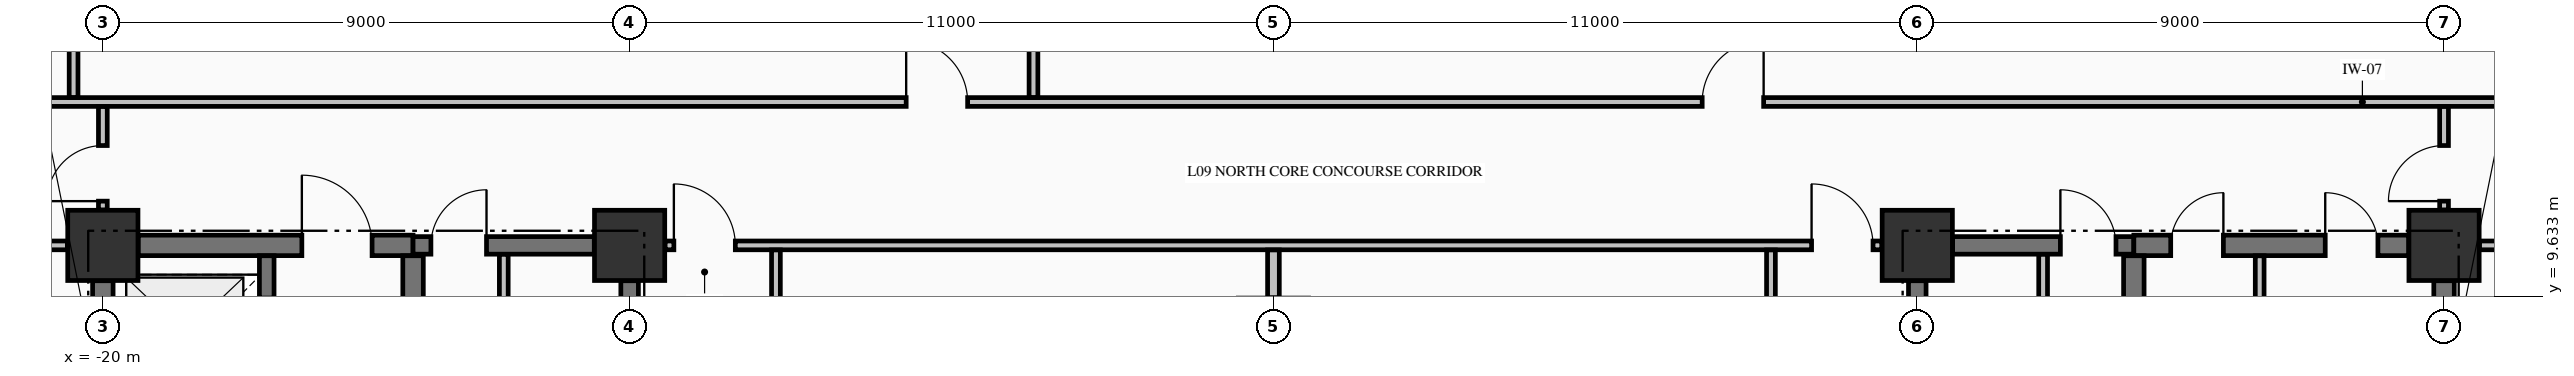
"""IFC4 building model, lengths in metres.
Left out: names, types, materials, properties, quantities, classifications, styles, units other than length and angle.
Written with IfcOpenShell. Run it as: python <this file> out.ifc"""

import sys

from ifc_helpers import new_model, si_unit, direction, frame, frame_2d, origin, origin_2d, place, context, subcontext, project, spatial, rectangle, extrude, element, fill, save


model = new_model("IFC4")
c1 = context("Model", 3, precision=1e-05, world=origin(), true_north=direction((0.0, 1.0)))
c2 = subcontext(c1, "Body", "Model", "MODEL_VIEW")
j1 = project(units=[si_unit("LENGTHUNIT", "METRE"), si_unit("PLANEANGLEUNIT", "RADIAN")], contexts=[c1])
p1 = place(None, origin())
s1 = spatial("IfcSite", under=j1, at=p1, CompositionType="ELEMENT")
p2 = place(p1, origin())
s2 = spatial("IfcBuilding", under=s1, at=p2, CompositionType="ELEMENT")
p3 = place(p2, frame((0.0, 0.0, 41.48)))
s3 = spatial("IfcBuildingStorey", under=s2, at=p3, CompositionType="ELEMENT", Elevation=41.48)
for number, where, z_axis, x_axis in (
    (1, (-20.0, 10.5, -0.25), (0.0, 0.0, 1.0), (1.0, 0.0, 0.0)),
    (2, (-11.0, 10.5, -0.25), (0.0, 0.0, 1.0), (1.0, 0.0, 0.0)),
    (3, (11.0, 10.5, -0.25), (0.0, 0.0, 1.0), (1.0, 0.0, 0.0)),
    (4, (20.0, 10.5, -0.25), (0.0, 0.0, 1.0), (1.0, 0.0, 0.0)),
):
    element("IfcColumn", number, at=place(p3, frame(where, z_axis=z_axis, x_axis=x_axis)), inside=s3, PredefinedType="COLUMN", context=c2, shape_type="SweptSolid", body=[
        extrude(rectangle(XDim=1.2, YDim=1.2, at=origin_2d()), origin(), (0.0, 0.0, 1.0), 3.57),
    ])
p4 = place(p3, frame((-19.396, 10.5, 0.0), z_axis=(0.0, 0.0, 1.0), x_axis=(1.0, 0.0, 0.0)))
e5 = element("IfcWall", 5, at=p4, inside=s3, PredefinedType="SHEAR", context=c2, shape_type="SweptSolid", body=[
    extrude(rectangle(XDim=4.696, YDim=0.35, at=frame_2d((2.348, 0.0))), origin(), (0.0, 0.0, 1.0), 3.32),
])
p5 = place(p4, frame((2.796, 0.0, 0.0)))
e6 = element("IfcOpeningElement", 6, at=p5, cuts=e5, PredefinedType="OPENING", context=c2, shape_type="SweptSolid", body=[
    extrude(rectangle(XDim=1.2, YDim=2.15, at=frame_2d((0.6, 1.075))), frame((0.0, 0.185, 0.0), z_axis=(0.0, -1.0, 0.0), x_axis=(1.0, 0.0, 0.0)), (0.0, 0.0, 1.0), 0.37),
])
p6 = place(p3, frame((-14.7, 10.5, 0.0), z_axis=(0.0, 0.0, 1.0), x_axis=(1.0, 0.0, 0.0)))
e7 = element("IfcWall", 7, at=p6, inside=s3, PredefinedType="SHEAR", context=c2, shape_type="SweptSolid", body=[
    extrude(rectangle(XDim=3.096, YDim=0.3, at=frame_2d((1.548, 0.0))), origin(), (0.0, 0.0, 1.0), 3.32),
])
p7 = place(p6, frame((0.305, 0.0, 0.0)))
e8 = element("IfcOpeningElement", 8, at=p7, cuts=e7, PredefinedType="OPENING", context=c2, shape_type="SweptSolid", body=[
    extrude(rectangle(XDim=0.95, YDim=2.15, at=frame_2d((0.475, 1.075))), frame((0.0, 0.16, 0.0), z_axis=(0.0, -1.0, 0.0), x_axis=(1.0, 0.0, 0.0)), (0.0, 0.0, 1.0), 0.32),
])
p8 = place(p3, frame((11.604, 10.5, 0.0), z_axis=(0.0, 0.0, 1.0), x_axis=(1.0, 0.0, 0.0)))
e9 = element("IfcWall", 9, at=p8, inside=s3, PredefinedType="SHEAR", context=c2, shape_type="SweptSolid", body=[
    extrude(rectangle(XDim=3.096, YDim=0.3, at=frame_2d((1.548, 0.0))), origin(), (0.0, 0.0, 1.0), 3.32),
])
p9 = place(p8, frame((1.841, 0.0, 0.0)))
e10 = element("IfcOpeningElement", 10, at=p9, cuts=e9, PredefinedType="OPENING", context=c2, shape_type="SweptSolid", body=[
    extrude(rectangle(XDim=0.95, YDim=2.15, at=frame_2d((0.475, 1.075))), frame((0.0, 0.16, 0.0), z_axis=(0.0, -1.0, 0.0), x_axis=(1.0, 0.0, 0.0)), (0.0, 0.0, 1.0), 0.32),
])
p10 = place(p3, frame((14.7, 10.5, 0.0), z_axis=(0.0, 0.0, 1.0), x_axis=(1.0, 0.0, 0.0)))
e11 = element("IfcWall", 11, at=p10, inside=s3, PredefinedType="SHEAR", context=c2, shape_type="SweptSolid", body=[
    extrude(rectangle(XDim=4.696, YDim=0.35, at=frame_2d((2.348, 0.0))), origin(), (0.0, 0.0, 1.0), 3.32),
])
p11 = place(p10, frame((0.63, 0.0, 0.0)))
e12 = element("IfcOpeningElement", 12, at=p11, cuts=e11, PredefinedType="OPENING", context=c2, shape_type="SweptSolid", body=[
    extrude(rectangle(XDim=0.9, YDim=2.15, at=frame_2d((0.45, 1.075))), frame((0.0, 0.185, 0.0), z_axis=(0.0, -1.0, 0.0), x_axis=(1.0, 0.0, 0.0)), (0.0, 0.0, 1.0), 0.37),
])
p12 = place(p10, frame((3.27, 0.0, 0.0)))
e13 = element("IfcOpeningElement", 13, at=p12, cuts=e11, PredefinedType="OPENING", context=c2, shape_type="SweptSolid", body=[
    extrude(rectangle(XDim=0.9, YDim=2.15, at=frame_2d((0.45, 1.075))), frame((0.0, 0.185, 0.0), z_axis=(0.0, -1.0, 0.0), x_axis=(1.0, 0.0, 0.0)), (0.0, 0.0, 1.0), 0.37),
])
p13 = place(p3, frame((-23.835, 10.5, 0.0), z_axis=(0.0, 0.0, 1.0), x_axis=(1.0, 0.0, 0.0)))
e14 = element("IfcWall", 14, at=p13, inside=s3, PredefinedType="PARTITIONING", context=c2, shape_type="SweptSolid", body=[
    extrude(rectangle(XDim=3.229, YDim=0.15, at=frame_2d((1.615, 0.0))), origin(), (0.0, 0.0, 1.0), 3.32),
])
p14 = place(p13, frame((1.36, 0.0, 0.0)))
e15 = element("IfcOpeningElement", 15, at=p14, cuts=e14, PredefinedType="OPENING", context=c2, shape_type="SweptSolid", body=[
    extrude(rectangle(XDim=0.95, YDim=2.15, at=frame_2d((0.475, 1.075))), frame((0.0, 0.085, 0.0), z_axis=(0.0, -1.0, 0.0), x_axis=(1.0, 0.0, 0.0)), (0.0, 0.0, 1.0), 0.17),
])
p15 = place(p3, frame((-10.394, 10.5, 0.0), z_axis=(0.0, 0.0, 1.0), x_axis=(1.0, 0.0, 0.0)))
e16 = element("IfcWall", 16, at=p15, inside=s3, PredefinedType="PARTITIONING", context=c2, shape_type="SweptSolid", body=[
    extrude(rectangle(XDim=20.788, YDim=0.15, at=frame_2d((10.394, 0.0))), origin(), (0.0, 0.0, 1.0), 3.32),
])
p16 = place(p15, frame((0.15, 0.0, 0.0)))
e17 = element("IfcOpeningElement", 17, at=p16, cuts=e16, PredefinedType="OPENING", context=c2, shape_type="SweptSolid", body=[
    extrude(rectangle(XDim=1.05, YDim=2.15, at=frame_2d((0.525, 1.075))), frame((0.0, 0.085, 0.0), z_axis=(0.0, -1.0, 0.0), x_axis=(1.0, 0.0, 0.0)), (0.0, 0.0, 1.0), 0.17),
])
p17 = place(p15, frame((19.588, 0.0, 0.0)))
e18 = element("IfcOpeningElement", 18, at=p17, cuts=e16, PredefinedType="OPENING", context=c2, shape_type="SweptSolid", body=[
    extrude(rectangle(XDim=1.05, YDim=2.15, at=frame_2d((0.525, 1.075))), frame((0.0, 0.085, 0.0), z_axis=(0.0, -1.0, 0.0), x_axis=(1.0, 0.0, 0.0)), (0.0, 0.0, 1.0), 0.17),
])
p18 = place(p3, frame((20.606, 10.5, 0.0), z_axis=(0.0, 0.0, 1.0), x_axis=(1.0, 0.0, 0.0)))
e19 = element("IfcWall", 19, at=p18, inside=s3, PredefinedType="PARTITIONING", context=c2, shape_type="SweptSolid", body=[
    extrude(rectangle(XDim=8.229, YDim=0.15, at=frame_2d((4.115, 0.0))), origin(), (0.0, 0.0, 1.0), 3.32),
])
p19 = place(p18, frame((3.394, 0.0, 0.0)))
e20 = element("IfcOpeningElement", 20, at=p19, cuts=e19, PredefinedType="OPENING", context=c2, shape_type="SweptSolid", body=[
    extrude(rectangle(XDim=1.0, YDim=2.15, at=frame_2d((0.5, 1.075))), frame((0.0, 0.085, 0.0), z_axis=(0.0, -1.0, 0.0), x_axis=(1.0, 0.0, 0.0)), (0.0, 0.0, 1.0), 0.17),
])
p20 = place(p3, frame((-23.835, 12.95, 0.0), z_axis=(0.0, 0.0, 1.0), x_axis=(1.0, 0.0, 0.0)))
e21 = element("IfcWall", 21, at=p20, inside=s3, PredefinedType="PARTITIONING", context=c2, shape_type="SweptSolid", body=[
    extrude(rectangle(XDim=52.67, YDim=0.15, at=frame_2d((26.335, 0.0))), origin(), (0.0, 0.0, 1.0), 3.32),
])
p21 = place(p20, frame((17.56, 0.0, 0.0)))
e22 = element("IfcOpeningElement", 22, at=p21, cuts=e21, PredefinedType="OPENING", context=c2, shape_type="SweptSolid", body=[
    extrude(rectangle(XDim=1.05, YDim=2.15, at=frame_2d((0.525, 1.075))), frame((0.0, 0.085, 0.0), z_axis=(0.0, -1.0, 0.0), x_axis=(1.0, 0.0, 0.0)), (0.0, 0.0, 1.0), 0.17),
])
p22 = place(p20, frame((31.16, 0.0, 0.0)))
e23 = element("IfcOpeningElement", 23, at=p22, cuts=e21, PredefinedType="OPENING", context=c2, shape_type="SweptSolid", body=[
    extrude(rectangle(XDim=1.05, YDim=2.15, at=frame_2d((0.525, 1.075))), frame((0.0, 0.085, 0.0), z_axis=(0.0, -1.0, 0.0), x_axis=(1.0, 0.0, 0.0)), (0.0, 0.0, 1.0), 0.17),
])
p23 = place(p3, frame((-20.0, 7.727, 0.0), z_axis=(0.0, 0.0, 1.0), x_axis=(0.0, 1.0, 0.0)))
e24 = element("IfcWall", 24, at=p23, inside=s3, PredefinedType="SHEAR", context=c2, shape_type="SweptSolid", body=[
    extrude(rectangle(XDim=2.169, YDim=0.35, at=frame_2d((1.084, 0.0))), origin(), (0.0, 0.0, 1.0), 3.32),
])
p24 = place(p3, frame((-17.2, 7.727, 0.0), z_axis=(0.0, 0.0, 1.0), x_axis=(0.0, 1.0, 0.0)))
e25 = element("IfcWall", 25, at=p24, inside=s3, PredefinedType="SOLIDWALL", context=c2, shape_type="SweptSolid", body=[
    extrude(rectangle(XDim=2.596, YDim=0.25, at=frame_2d((1.298, 0.0))), origin(), (0.0, 0.0, 1.0), 3.32),
])
p25 = place(p24, frame((0.773, 0.0, 0.0)))
e26 = element("IfcOpeningElement", 26, at=p25, cuts=e25, PredefinedType="OPENING", context=c2, shape_type="SweptSolid", body=[
    extrude(rectangle(XDim=1.1, YDim=2.2, at=frame_2d((0.55, 1.1))), frame((0.0, 0.135, 0.0), z_axis=(0.0, -1.0, 0.0), x_axis=(1.0, 0.0, 0.0)), (0.0, 0.0, 1.0), 0.27),
])
p26 = place(p3, frame((-14.7, 5.852, 0.0), z_axis=(0.0, 0.0, 1.0), x_axis=(0.0, 1.0, 0.0)))
e27 = element("IfcWall", 27, at=p26, inside=s3, PredefinedType="SHEAR", context=c2, shape_type="SweptSolid", body=[
    extrude(rectangle(XDim=4.471, YDim=0.35, at=frame_2d((2.235, 0.0))), origin(), (0.0, 0.0, 1.0), 3.32),
])
for number, where, z_axis, x_axis in (
    (28, (-11.0, 5.852, 0.0), (0.0, 0.0, 1.0), (0.0, 1.0, 0.0)),
    (29, (11.0, 5.852, 0.0), (0.0, 0.0, 1.0), (0.0, 1.0, 0.0)),
):
    element("IfcWall", number, at=place(p3, frame(where, z_axis=z_axis, x_axis=x_axis)), inside=s3, PredefinedType="SHEAR", context=c2, shape_type="SweptSolid", body=[
        extrude(rectangle(XDim=4.044, YDim=0.3, at=frame_2d((2.022, 0.0))), origin(), (0.0, 0.0, 1.0), 3.32),
    ])
p27 = place(p3, frame((14.7, 5.852, 0.0), z_axis=(0.0, 0.0, 1.0), x_axis=(0.0, 1.0, 0.0)))
e30 = element("IfcWall", 30, at=p27, inside=s3, PredefinedType="SHEAR", context=c2, shape_type="SweptSolid", body=[
    extrude(rectangle(XDim=4.471, YDim=0.35, at=frame_2d((2.235, 0.0))), origin(), (0.0, 0.0, 1.0), 3.32),
])
p28 = place(p3, frame((20.0, 0.604, 0.0), z_axis=(0.0, 0.0, 1.0), x_axis=(0.0, 1.0, 0.0)))
e31 = element("IfcWall", 31, at=p28, inside=s3, PredefinedType="SHEAR", context=c2, shape_type="SweptSolid", body=[
    extrude(rectangle(XDim=9.292, YDim=0.35, at=frame_2d((4.646, 0.0))), origin(), (0.0, 0.0, 1.0), 3.32),
])
p29 = place(p3, frame((-20.5, 13.028, 0.0), z_axis=(0.0, 0.0, 1.0), x_axis=(0.0, 1.0, 0.0)))
e32 = element("IfcWall", 32, at=p29, inside=s3, PredefinedType="PARTITIONING", context=c2, shape_type="SweptSolid", body=[
    extrude(rectangle(XDim=9.266, YDim=0.15, at=frame_2d((4.633, 0.0))), origin(), (0.0, 0.0, 1.0), 3.32),
])
p30 = place(p3, frame((-20.0, 11.106, 0.0), z_axis=(0.0, 0.0, 1.0), x_axis=(0.0, 1.0, 0.0)))
e33 = element("IfcWall", 33, at=p30, inside=s3, PredefinedType="PARTITIONING", context=c2, shape_type="SweptSolid", body=[
    extrude(rectangle(XDim=1.766, YDim=0.15, at=frame_2d((0.883, 0.0))), origin(), (0.0, 0.0, 1.0), 3.32),
])
p31 = place(p30, frame((0.15, 0.0, 0.0)))
e34 = element("IfcOpeningElement", 34, at=p31, cuts=e33, PredefinedType="OPENING", context=c2, shape_type="SweptSolid", body=[
    extrude(rectangle(XDim=0.95, YDim=2.15, at=frame_2d((0.475, 1.075))), frame((0.0, 0.085, 0.0), z_axis=(0.0, -1.0, 0.0), x_axis=(1.0, 0.0, 0.0)), (0.0, 0.0, 1.0), 0.17),
])
p32 = place(p3, frame((-13.15, 7.228, 0.0), z_axis=(0.0, 0.0, 1.0), x_axis=(0.0, 1.0, 0.0)))
e35 = element("IfcWall", 35, at=p32, inside=s3, PredefinedType="PARTITIONING", context=c2, shape_type="SweptSolid", body=[
    extrude(rectangle(XDim=3.119, YDim=0.15, at=frame_2d((1.56, 0.0))), origin(), (0.0, 0.0, 1.0), 3.32),
])
p33 = place(p32, frame((1.097, 0.0, 0.0)))
e36 = element("IfcOpeningElement", 36, at=p33, cuts=e35, PredefinedType="OPENING", context=c2, shape_type="SweptSolid", body=[
    extrude(rectangle(XDim=0.95, YDim=2.15, at=frame_2d((0.475, 1.075))), frame((0.0, 0.085, 0.0), z_axis=(0.0, -1.0, 0.0), x_axis=(1.0, 0.0, 0.0)), (0.0, 0.0, 1.0), 0.17),
])
p34 = place(p3, frame((-8.5, 3.703, 0.0), z_axis=(0.0, 0.0, 1.0), x_axis=(0.0, 1.0, 0.0)))
e37 = element("IfcWall", 37, at=p34, inside=s3, PredefinedType="PARTITIONING", context=c2, shape_type="SweptSolid", body=[
    extrude(rectangle(XDim=6.719, YDim=0.15, at=frame_2d((3.36, 0.0))), origin(), (0.0, 0.0, 1.0), 3.32),
])
p35 = place(p34, frame((2.822, 0.0, 0.0)))
e38 = element("IfcOpeningElement", 38, at=p35, cuts=e37, PredefinedType="OPENING", context=c2, shape_type="SweptSolid", body=[
    extrude(rectangle(XDim=1.05, YDim=2.15, at=frame_2d((0.525, 1.075))), frame((0.0, 0.085, 0.0), z_axis=(0.0, -1.0, 0.0), x_axis=(1.0, 0.0, 0.0)), (0.0, 0.0, 1.0), 0.17),
])
p36 = place(p3, frame((-4.1, 13.028, 0.0), z_axis=(0.0, 0.0, 1.0), x_axis=(0.0, 1.0, 0.0)))
e39 = element("IfcWall", 39, at=p36, inside=s3, PredefinedType="PARTITIONING", context=c2, shape_type="SweptSolid", body=[
    extrude(rectangle(XDim=13.307, YDim=0.15, at=frame_2d((6.653, 0.0))), origin(), (0.0, 0.0, 1.0), 3.32),
])
p37 = place(p3, frame((0.0, 9.606, 0.0), z_axis=(0.0, 0.0, 1.0), x_axis=(0.0, 1.0, 0.0)))
e40 = element("IfcWall", 40, at=p37, inside=s3, PredefinedType="PARTITIONING", context=c2, shape_type="SweptSolid", body=[
    extrude(rectangle(XDim=0.816, YDim=0.2, at=frame_2d((0.408, 0.0))), origin(), (0.0, 0.0, 1.0), 2.66),
])
p38 = place(p3, frame((8.5, -1.097, 0.0), z_axis=(0.0, 0.0, 1.0), x_axis=(0.0, 1.0, 0.0)))
e41 = element("IfcWall", 41, at=p38, inside=s3, PredefinedType="PARTITIONING", context=c2, shape_type="SweptSolid", body=[
    extrude(rectangle(XDim=11.519, YDim=0.15, at=frame_2d((5.76, 0.0))), origin(), (0.0, 0.0, 1.0), 3.32),
])
p39 = place(p38, frame((5.197, 0.0, 0.0)))
e42 = element("IfcOpeningElement", 42, at=p39, cuts=e41, PredefinedType="OPENING", context=c2, shape_type="SweptSolid", body=[
    extrude(rectangle(XDim=1.1, YDim=2.15, at=frame_2d((0.55, 1.075))), frame((0.0, 0.085, 0.0), z_axis=(0.0, -1.0, 0.0), x_axis=(1.0, 0.0, 0.0)), (0.0, 0.0, 1.0), 0.17),
])
p40 = place(p3, frame((13.15, 7.228, 0.0), z_axis=(0.0, 0.0, 1.0), x_axis=(0.0, 1.0, 0.0)))
e43 = element("IfcWall", 43, at=p40, inside=s3, PredefinedType="PARTITIONING", context=c2, shape_type="SweptSolid", body=[
    extrude(rectangle(XDim=3.119, YDim=0.15, at=frame_2d((1.56, 0.0))), origin(), (0.0, 0.0, 1.0), 3.32),
])
p41 = place(p40, frame((1.097, 0.0, 0.0)))
e44 = element("IfcOpeningElement", 44, at=p41, cuts=e43, PredefinedType="OPENING", context=c2, shape_type="SweptSolid", body=[
    extrude(rectangle(XDim=0.95, YDim=2.15, at=frame_2d((0.475, 1.075))), frame((0.0, 0.085, 0.0), z_axis=(0.0, -1.0, 0.0), x_axis=(1.0, 0.0, 0.0)), (0.0, 0.0, 1.0), 0.17),
])
p42 = place(p3, frame((16.85, 3.078, 0.0), z_axis=(0.0, 0.0, 1.0), x_axis=(0.0, 1.0, 0.0)))
e45 = element("IfcWall", 45, at=p42, inside=s3, PredefinedType="PARTITIONING", context=c2, shape_type="SweptSolid", body=[
    extrude(rectangle(XDim=7.244, YDim=0.15, at=frame_2d((3.622, 0.0))), origin(), (0.0, 0.0, 1.0), 3.32),
])
p43 = place(p3, frame((20.0, 11.106, 0.0), z_axis=(0.0, 0.0, 1.0), x_axis=(0.0, 1.0, 0.0)))
e46 = element("IfcWall", 46, at=p43, inside=s3, PredefinedType="PARTITIONING", context=c2, shape_type="SweptSolid", body=[
    extrude(rectangle(XDim=1.766, YDim=0.15, at=frame_2d((0.883, 0.0))), origin(), (0.0, 0.0, 1.0), 2.66),
])
p44 = place(p43, frame((0.15, 0.0, 0.0)))
e47 = element("IfcOpeningElement", 47, at=p44, cuts=e46, PredefinedType="OPENING", context=c2, shape_type="SweptSolid", body=[
    extrude(rectangle(XDim=0.95, YDim=2.15, at=frame_2d((0.475, 1.075))), frame((0.0, 0.085, 0.0), z_axis=(0.0, -1.0, 0.0), x_axis=(1.0, 0.0, 0.0)), (0.0, 0.0, 1.0), 0.17),
])
p45 = place(p7, origin())
e48 = element("IfcDoor", 48, at=p45, inside=s3, OperationType="SINGLE_SWING_RIGHT", PredefinedType="DOOR", context=c2, shape_type="SweptSolid", body=[
    extrude(rectangle(XDim=0.95, YDim=2.15, at=frame_2d((0.475, 1.075))), frame((0.0, 0.025, 0.0), z_axis=(0.0, -1.0, 0.0), x_axis=(1.0, 0.0, 0.0)), (0.0, 0.0, 1.0), 0.05),
])
fill(e8, e48)
p46 = place(p9, origin())
e49 = element("IfcDoor", 49, at=p46, inside=s3, OperationType="SINGLE_SWING_LEFT", PredefinedType="DOOR", context=c2, shape_type="SweptSolid", body=[
    extrude(rectangle(XDim=0.95, YDim=2.15, at=frame_2d((0.475, 1.075))), frame((0.0, 0.025, 0.0), z_axis=(0.0, -1.0, 0.0), x_axis=(1.0, 0.0, 0.0)), (0.0, 0.0, 1.0), 0.05),
])
fill(e10, e49)
p47 = place(p5, origin())
e50 = element("IfcDoor", 50, at=p47, inside=s3, OperationType="SINGLE_SWING_LEFT", PredefinedType="DOOR", context=c2, shape_type="SweptSolid", body=[
    extrude(rectangle(XDim=1.2, YDim=2.15, at=frame_2d((0.6, 1.075))), frame((0.0, 0.025, 0.0), z_axis=(0.0, -1.0, 0.0), x_axis=(1.0, 0.0, 0.0)), (0.0, 0.0, 1.0), 0.05),
])
fill(e6, e50)
p48 = place(p11, origin())
e51 = element("IfcDoor", 51, at=p48, inside=s3, OperationType="SINGLE_SWING_RIGHT", PredefinedType="DOOR", context=c2, shape_type="SweptSolid", body=[
    extrude(rectangle(XDim=0.9, YDim=2.15, at=frame_2d((0.45, 1.075))), frame((0.0, 0.025, 0.0), z_axis=(0.0, -1.0, 0.0), x_axis=(1.0, 0.0, 0.0)), (0.0, 0.0, 1.0), 0.05),
])
fill(e12, e51)
p49 = place(p12, origin())
e52 = element("IfcDoor", 52, at=p49, inside=s3, OperationType="SINGLE_SWING_LEFT", PredefinedType="DOOR", context=c2, shape_type="SweptSolid", body=[
    extrude(rectangle(XDim=0.9, YDim=2.15, at=frame_2d((0.45, 1.075))), frame((0.0, 0.025, 0.0), z_axis=(0.0, -1.0, 0.0), x_axis=(1.0, 0.0, 0.0)), (0.0, 0.0, 1.0), 0.05),
])
fill(e13, e52)
p50 = place(p16, origin())
e53 = element("IfcDoor", 53, at=p50, inside=s3, OperationType="SINGLE_SWING_LEFT", PredefinedType="DOOR", context=c2, shape_type="SweptSolid", body=[
    extrude(rectangle(XDim=1.05, YDim=2.15, at=frame_2d((0.525, 1.075))), frame((0.0, 0.025, 0.0), z_axis=(0.0, -1.0, 0.0), x_axis=(1.0, 0.0, 0.0)), (0.0, 0.0, 1.0), 0.05),
])
fill(e17, e53)
p51 = place(p17, origin())
e54 = element("IfcDoor", 54, at=p51, inside=s3, OperationType="SINGLE_SWING_LEFT", PredefinedType="DOOR", context=c2, shape_type="SweptSolid", body=[
    extrude(rectangle(XDim=1.05, YDim=2.15, at=frame_2d((0.525, 1.075))), frame((0.0, 0.025, 0.0), z_axis=(0.0, -1.0, 0.0), x_axis=(1.0, 0.0, 0.0)), (0.0, 0.0, 1.0), 0.05),
])
fill(e18, e54)
p52 = place(p21, origin())
e55 = element("IfcDoor", 55, at=p52, inside=s3, OperationType="SINGLE_SWING_LEFT", PredefinedType="DOOR", context=c2, shape_type="SweptSolid", body=[
    extrude(rectangle(XDim=1.05, YDim=2.15, at=frame_2d((0.525, 1.075))), frame((0.0, 0.025, 0.0), z_axis=(0.0, -1.0, 0.0), x_axis=(1.0, 0.0, 0.0)), (0.0, 0.0, 1.0), 0.05),
])
fill(e22, e55)
p53 = place(p22, origin())
e56 = element("IfcDoor", 56, at=p53, inside=s3, OperationType="SINGLE_SWING_RIGHT", PredefinedType="DOOR", context=c2, shape_type="SweptSolid", body=[
    extrude(rectangle(XDim=1.05, YDim=2.15, at=frame_2d((0.525, 1.075))), frame((0.0, 0.025, 0.0), z_axis=(0.0, -1.0, 0.0), x_axis=(1.0, 0.0, 0.0)), (0.0, 0.0, 1.0), 0.05),
])
fill(e23, e56)
p54 = place(p31, origin())
e57 = element("IfcDoor", 57, at=p54, inside=s3, OperationType="SINGLE_SWING_LEFT", PredefinedType="DOOR", context=c2, shape_type="SweptSolid", body=[
    extrude(rectangle(XDim=0.95, YDim=2.15, at=frame_2d((0.475, 1.075))), frame((0.0, 0.025, 0.0), z_axis=(0.0, -1.0, 0.0), x_axis=(1.0, 0.0, 0.0)), (0.0, 0.0, 1.0), 0.05),
])
fill(e34, e57)
p55 = place(p44, origin())
e58 = element("IfcDoor", 58, at=p55, inside=s3, OperationType="SINGLE_SWING_LEFT", PredefinedType="DOOR", context=c2, shape_type="SweptSolid", body=[
    extrude(rectangle(XDim=0.95, YDim=2.15, at=frame_2d((0.475, 1.075))), frame((0.0, 0.025, 0.0), z_axis=(0.0, -1.0, 0.0), x_axis=(1.0, 0.0, 0.0)), (0.0, 0.0, 1.0), 0.05),
])
fill(e47, e58)
save(model, sys.argv[1])
